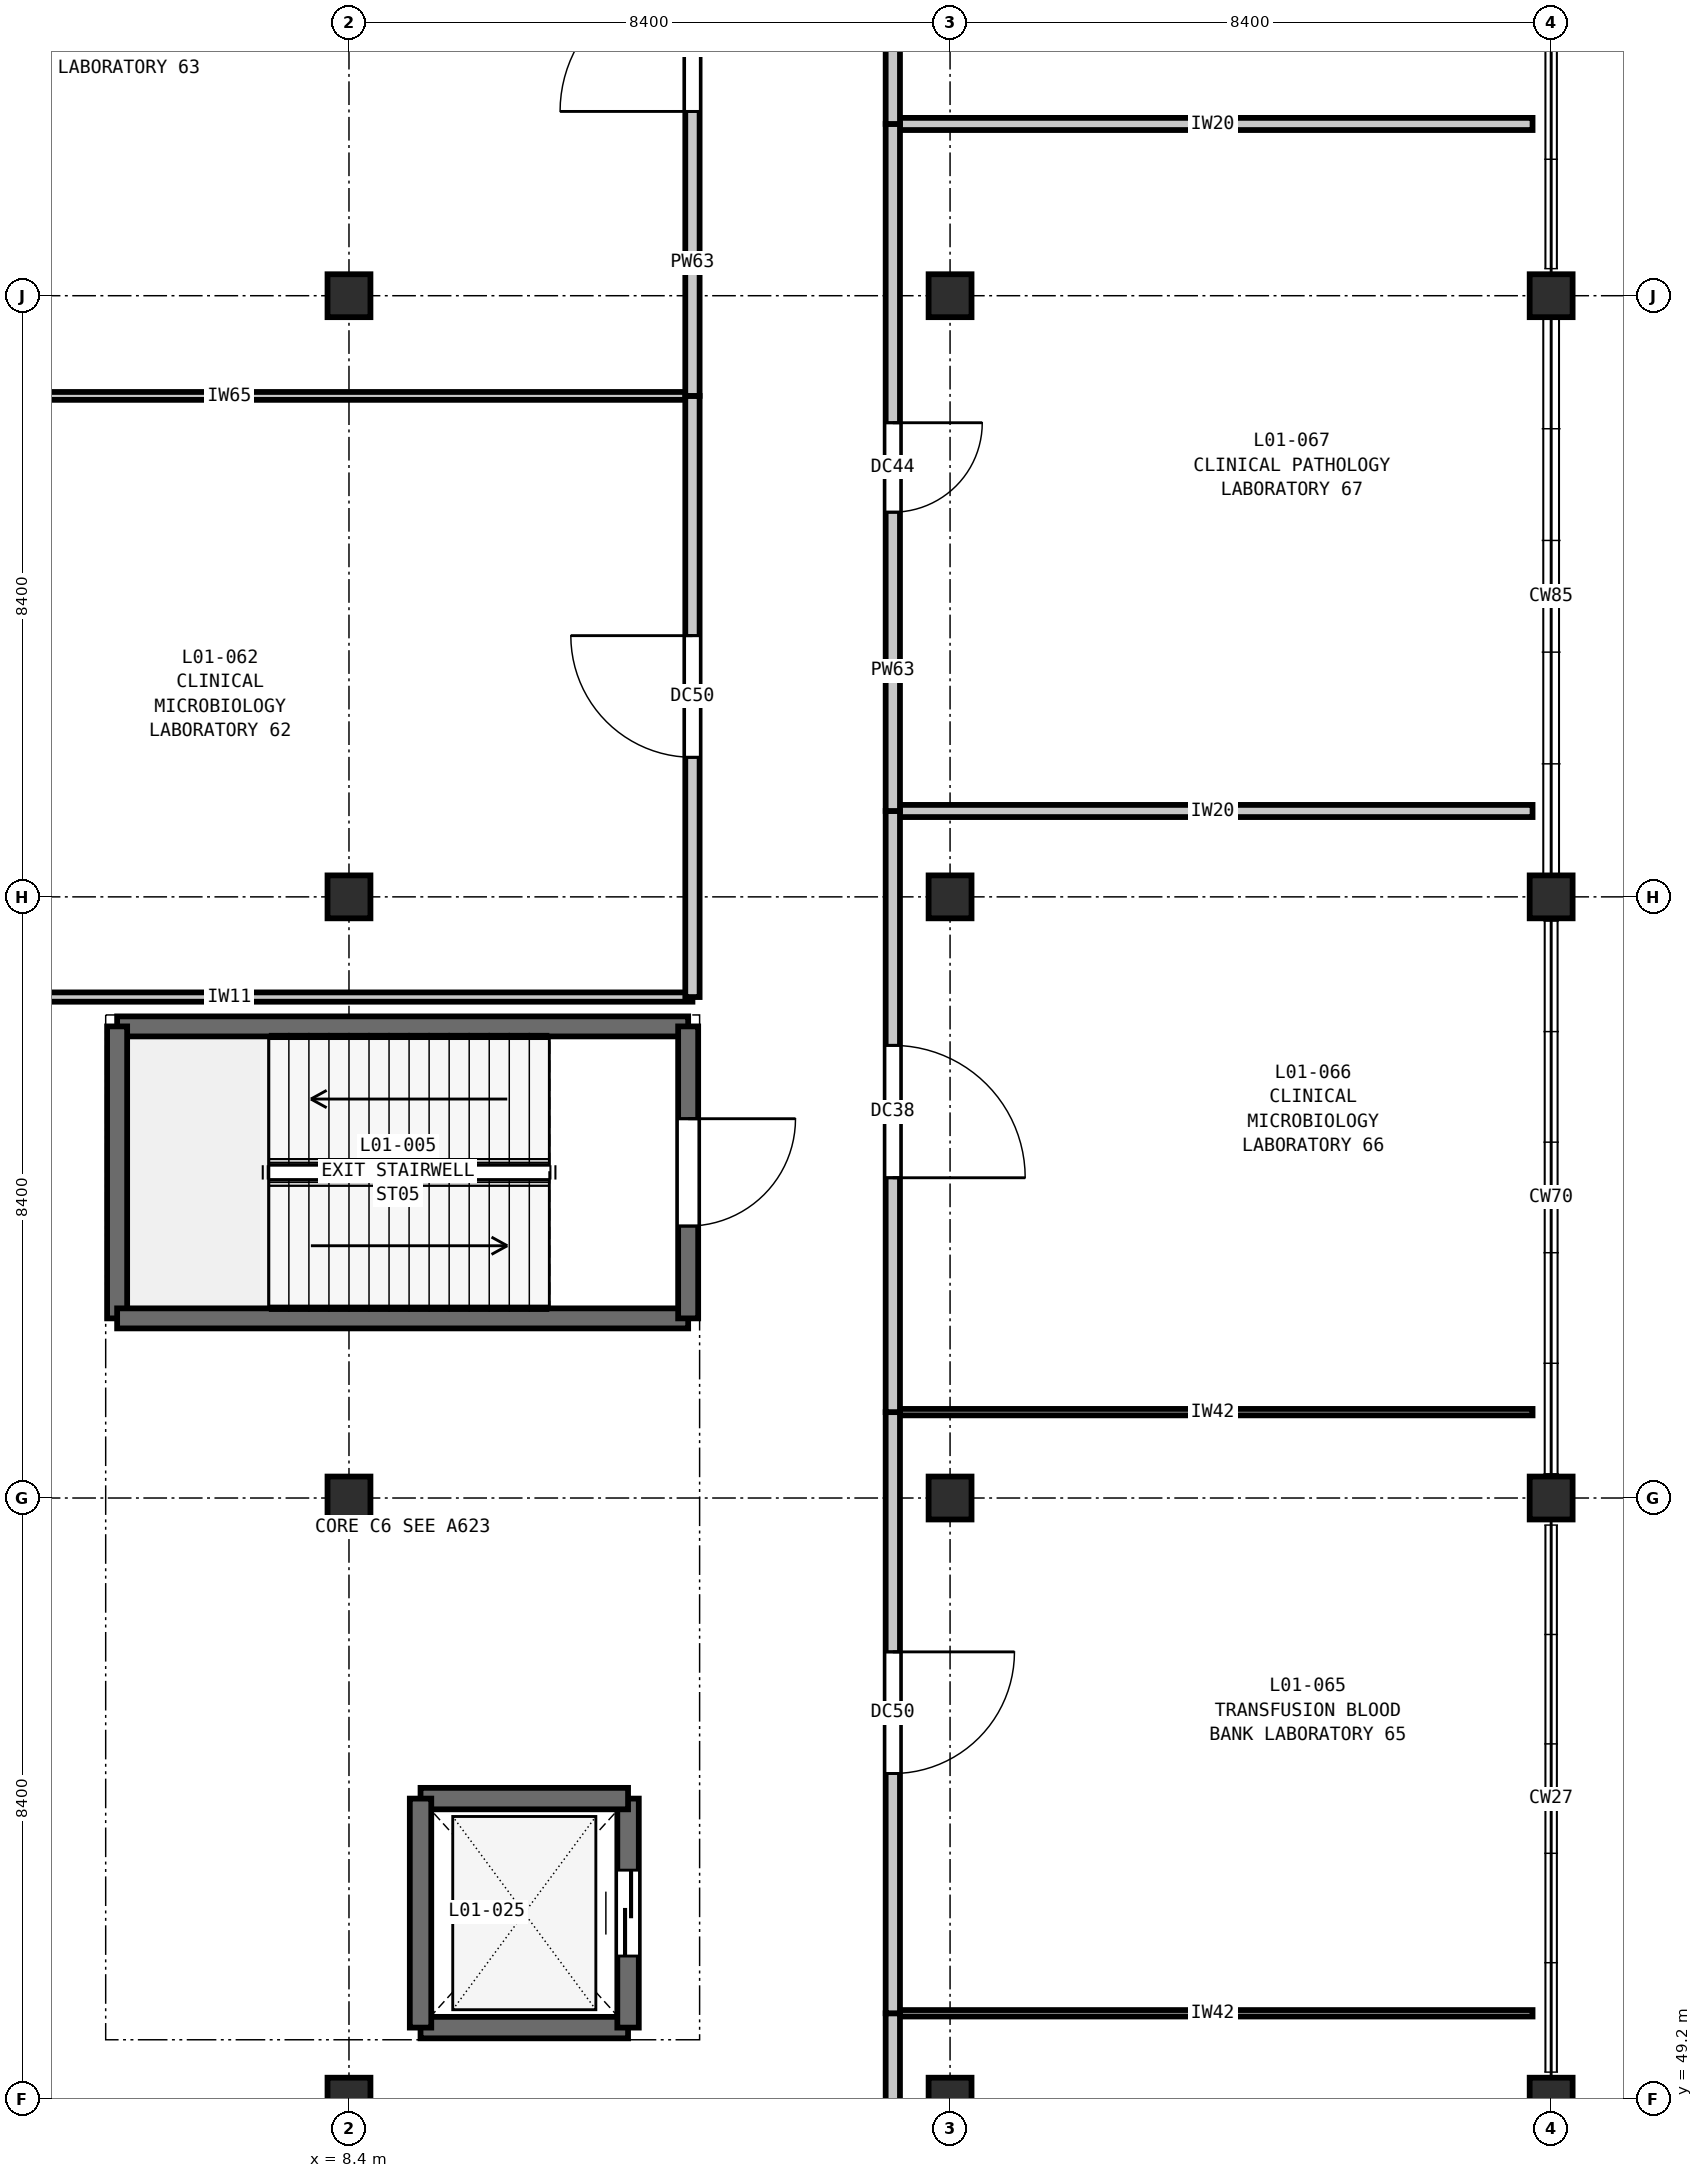
"""IFC4 building model, lengths in metres.
Left out: names, types, materials, properties, quantities, classifications, styles, units other than length and angle.
Written with IfcOpenShell. Run it as: python <this file> out.ifc"""

import sys

from ifc_helpers import new_model, si_unit, direction, frame, frame_2d, origin, origin_2d, place, context, subcontext, project, spatial, rectangle, extrude, element, fill, save


model = new_model("IFC4")
c1 = context("Model", 3, precision=1e-05, world=origin(), true_north=direction((0.0, 1.0)))
c2 = subcontext(c1, "Body", "Model", "MODEL_VIEW")
j1 = project(units=[si_unit("LENGTHUNIT", "METRE"), si_unit("PLANEANGLEUNIT", "RADIAN")], contexts=[c1])
p1 = place(None, origin())
s1 = spatial("IfcSite", under=j1, at=p1, CompositionType="ELEMENT")
p2 = place(p1, origin())
s2 = spatial("IfcBuilding", under=s1, at=p2, CompositionType="ELEMENT")
p3 = place(p2, frame((0.0, 0.0, 5.4)))
s3 = spatial("IfcBuildingStorey", under=s2, at=p3, CompositionType="ELEMENT", Elevation=5.4)
for number, where, z_axis, x_axis in (
    (1, (8.4, 49.2, 0.0), (0.0, 0.0, 1.0), (1.0, 0.0, 0.0)),
    (2, (8.4, 57.6, 0.0), (0.0, 0.0, 1.0), (1.0, 0.0, 0.0)),
    (3, (8.4, 66.0, 0.0), (0.0, 0.0, 1.0), (1.0, 0.0, 0.0)),
    (4, (8.4, 74.4, 0.0), (0.0, 0.0, 1.0), (1.0, 0.0, 0.0)),
    (5, (16.8, 49.2, 0.0), (0.0, 0.0, 1.0), (1.0, 0.0, 0.0)),
    (6, (16.8, 57.6, 0.0), (0.0, 0.0, 1.0), (1.0, 0.0, 0.0)),
    (7, (16.8, 66.0, 0.0), (0.0, 0.0, 1.0), (1.0, 0.0, 0.0)),
    (8, (16.8, 74.4, 0.0), (0.0, 0.0, 1.0), (1.0, 0.0, 0.0)),
    (9, (25.2, 49.2, 0.0), (0.0, 0.0, 1.0), (1.0, 0.0, 0.0)),
    (10, (25.2, 57.6, 0.0), (0.0, 0.0, 1.0), (1.0, 0.0, 0.0)),
    (11, (25.2, 66.0, 0.0), (0.0, 0.0, 1.0), (1.0, 0.0, 0.0)),
    (12, (25.2, 74.4, 0.0), (0.0, 0.0, 1.0), (1.0, 0.0, 0.0)),
):
    element("IfcColumn", number, at=place(p3, frame(where, z_axis=z_axis, x_axis=x_axis)), inside=s3, PredefinedType="COLUMN", context=c2, shape_type="SweptSolid", body=[
        extrude(rectangle(XDim=0.6, YDim=0.6, at=origin_2d()), origin(), (0.0, 0.0, 1.0), 5.4),
    ])
p4 = place(p3, frame((13.14, 64.19, 0.0), z_axis=(0.0, 0.0, 1.0), x_axis=(-1.0, 0.0, 0.0)))
e13 = element("IfcWall", 13, at=p4, inside=s3, PredefinedType="SHEAR", context=c2, shape_type="SweptSolid", body=[
    extrude(rectangle(XDim=7.98, YDim=0.28, at=frame_2d((3.99, 0.0))), origin(), (0.0, 0.0, 1.0), 5.4),
])
p5 = place(p3, frame((5.16, 64.19, 0.0), z_axis=(0.0, 0.0, 1.0), x_axis=(0.0, -1.0, 0.0)))
e14 = element("IfcWall", 14, at=p5, inside=s3, PredefinedType="SHEAR", context=c2, shape_type="SweptSolid", body=[
    extrude(rectangle(XDim=4.08, YDim=0.28, at=frame_2d((2.04, 0.0))), origin(), (0.0, 0.0, 1.0), 5.4),
])
p6 = place(p3, frame((5.16, 60.11, 0.0), z_axis=(0.0, 0.0, 1.0), x_axis=(1.0, 0.0, 0.0)))
e15 = element("IfcWall", 15, at=p6, inside=s3, PredefinedType="SHEAR", context=c2, shape_type="SweptSolid", body=[
    extrude(rectangle(XDim=7.98, YDim=0.28, at=frame_2d((3.99, 0.0))), origin(), (0.0, 0.0, 1.0), 5.4),
])
p7 = place(p3, frame((13.14, 60.11, 0.0), z_axis=(0.0, 0.0, 1.0), x_axis=(0.0, 1.0, 0.0)))
e16 = element("IfcWall", 16, at=p7, inside=s3, PredefinedType="SHEAR", context=c2, shape_type="SweptSolid", body=[
    extrude(rectangle(XDim=4.08, YDim=0.28, at=frame_2d((2.04, 0.0))), origin(), (0.0, 0.0, 1.0), 5.4),
])
p8 = place(p7, frame((1.29, 0.0, 0.0)))
e17 = element("IfcOpeningElement", 17, at=p8, cuts=e16, PredefinedType="OPENING", context=c2, shape_type="SweptSolid", body=[
    extrude(rectangle(XDim=1.5, YDim=2.2, at=frame_2d((0.75, 1.1))), frame((0.0, 0.15, 0.0), z_axis=(0.0, -1.0, 0.0), x_axis=(1.0, 0.0, 0.0)), (0.0, 0.0, 1.0), 0.3),
])
p9 = place(p3, frame((9.4, 50.2, 0.0), z_axis=(0.0, 0.0, 1.0), x_axis=(1.0, 0.0, 0.0)))
e18 = element("IfcWall", 18, at=p9, inside=s3, PredefinedType="SHEAR", context=c2, shape_type="SweptSolid", body=[
    extrude(rectangle(XDim=2.9, YDim=0.3, at=frame_2d((1.45, 0.0))), origin(), (0.0, 0.0, 1.0), 5.4),
])
p10 = place(p3, frame((12.3, 50.2, 0.0), z_axis=(0.0, 0.0, 1.0), x_axis=(0.0, 1.0, 0.0)))
e19 = element("IfcWall", 19, at=p10, inside=s3, PredefinedType="SHEAR", context=c2, shape_type="SweptSolid", body=[
    extrude(rectangle(XDim=3.2, YDim=0.3, at=frame_2d((1.6, 0.0))), origin(), (0.0, 0.0, 1.0), 5.4),
])
p11 = place(p10, frame((1.0, 0.0, 0.0)))
e20 = element("IfcOpeningElement", 20, at=p11, cuts=e19, PredefinedType="OPENING", context=c2, shape_type="SweptSolid", body=[
    extrude(rectangle(XDim=1.2, YDim=2.2, at=frame_2d((0.6, 1.1))), frame((0.0, 0.16, 0.0), z_axis=(0.0, -1.0, 0.0), x_axis=(1.0, 0.0, 0.0)), (0.0, 0.0, 1.0), 0.32),
])
p12 = place(p3, frame((12.3, 53.4, 0.0), z_axis=(0.0, 0.0, 1.0), x_axis=(-1.0, 0.0, 0.0)))
e21 = element("IfcWall", 21, at=p12, inside=s3, PredefinedType="SHEAR", context=c2, shape_type="SweptSolid", body=[
    extrude(rectangle(XDim=2.9, YDim=0.3, at=frame_2d((1.45, 0.0))), origin(), (0.0, 0.0, 1.0), 5.4),
])
p13 = place(p3, frame((9.4, 53.4, 0.0), z_axis=(0.0, 0.0, 1.0), x_axis=(0.0, -1.0, 0.0)))
e22 = element("IfcWall", 22, at=p13, inside=s3, PredefinedType="SHEAR", context=c2, shape_type="SweptSolid", body=[
    extrude(rectangle(XDim=3.2, YDim=0.3, at=frame_2d((1.6, 0.0))), origin(), (0.0, 0.0, 1.0), 5.4),
])
for number, where, z_axis, x_axis in (
    (23, (16.0, 50.4, 0.0), (0.0, 0.0, 1.0), (1.0, 0.0, 0.0)),
    (24, (16.0, 58.8, 0.0), (0.0, 0.0, 1.0), (1.0, 0.0, 0.0)),
):
    element("IfcWall", number, at=place(p3, frame(where, z_axis=z_axis, x_axis=x_axis)), inside=s3, PredefinedType="PARTITIONING", context=c2, shape_type="SweptSolid", body=[
        extrude(rectangle(XDim=8.94, YDim=0.09, at=frame_2d((4.47, 0.0))), origin(), (0.0, 0.0, 1.0), 5.05),
    ])
p14 = place(p3, frame((0.26, 64.6, 0.0), z_axis=(0.0, 0.0, 1.0), x_axis=(1.0, 0.0, 0.0)))
e25 = element("IfcWall", 25, at=p14, inside=s3, PredefinedType="PARTITIONING", context=c2, shape_type="SweptSolid", body=[
    extrude(rectangle(XDim=12.94, YDim=0.13, at=frame_2d((6.47, 0.0))), origin(), (0.0, 0.0, 1.0), 5.05),
])
p15 = place(p3, frame((16.0, 67.2, 0.0), z_axis=(0.0, 0.0, 1.0), x_axis=(1.0, 0.0, 0.0)))
e26 = element("IfcWall", 26, at=p15, inside=s3, PredefinedType="PARTITIONING", context=c2, shape_type="SweptSolid", body=[
    extrude(rectangle(XDim=8.94, YDim=0.17, at=frame_2d((4.47, 0.0))), origin(), (0.0, 0.0, 1.0), 5.05),
])
p16 = place(p3, frame((0.26, 73.0, 0.0), z_axis=(0.0, 0.0, 1.0), x_axis=(1.0, 0.0, 0.0)))
e27 = element("IfcWall", 27, at=p16, inside=s3, PredefinedType="PARTITIONING", context=c2, shape_type="SweptSolid", body=[
    extrude(rectangle(XDim=12.94, YDim=0.11, at=frame_2d((6.47, 0.0))), origin(), (0.0, 0.0, 1.0), 5.05),
])
p17 = place(p3, frame((16.0, 76.8, 0.0), z_axis=(0.0, 0.0, 1.0), x_axis=(1.0, 0.0, 0.0)))
e28 = element("IfcWall", 28, at=p17, inside=s3, PredefinedType="PARTITIONING", context=c2, shape_type="SweptSolid", body=[
    extrude(rectangle(XDim=8.94, YDim=0.17, at=frame_2d((4.47, 0.0))), origin(), (0.0, 0.0, 1.0), 5.05),
])
p18 = place(p3, frame((13.2, 64.6, 0.0), z_axis=(0.0, 0.0, 1.0), x_axis=(0.0, 1.0, 0.0)))
e29 = element("IfcWall", 29, at=p18, inside=s3, PredefinedType="PARTITIONING", context=c2, shape_type="SweptSolid", body=[
    extrude(rectangle(XDim=8.4, YDim=0.2, at=frame_2d((4.2, 0.0))), origin(), (0.0, 0.0, 1.0), 5.05),
])
p19 = place(p18, frame((3.35, 0.0, 0.0)))
e30 = element("IfcOpeningElement", 30, at=p19, cuts=e29, PredefinedType="OPENING", context=c2, shape_type="SweptSolid", body=[
    extrude(rectangle(XDim=1.7, YDim=2.3, at=frame_2d((0.85, 1.15))), frame((0.0, 0.11, 0.0), z_axis=(0.0, -1.0, 0.0), x_axis=(1.0, 0.0, 0.0)), (0.0, 0.0, 1.0), 0.22),
])
p20 = place(p3, frame((13.2, 73.0, 0.0), z_axis=(0.0, 0.0, 1.0), x_axis=(0.0, 1.0, 0.0)))
e31 = element("IfcWall", 31, at=p20, inside=s3, PredefinedType="PARTITIONING", context=c2, shape_type="SweptSolid", body=[
    extrude(rectangle(XDim=9.8, YDim=0.2, at=frame_2d((4.9, 0.0))), origin(), (0.0, 0.0, 1.0), 5.05),
])
p21 = place(p20, frame((3.975, 0.0, 0.0)))
e32 = element("IfcOpeningElement", 32, at=p21, cuts=e31, PredefinedType="OPENING", context=c2, shape_type="SweptSolid", body=[
    extrude(rectangle(XDim=1.85, YDim=2.3, at=frame_2d((0.925, 1.15))), frame((0.0, 0.11, 0.0), z_axis=(0.0, -1.0, 0.0), x_axis=(1.0, 0.0, 0.0)), (0.0, 0.0, 1.0), 0.22),
])
p22 = place(p3, frame((16.0, 40.8, 0.0), z_axis=(0.0, 0.0, 1.0), x_axis=(0.0, 1.0, 0.0)))
e33 = element("IfcWall", 33, at=p22, inside=s3, PredefinedType="PARTITIONING", context=c2, shape_type="SweptSolid", body=[
    extrude(rectangle(XDim=9.6, YDim=0.2, at=frame_2d((4.8, 0.0))), origin(), (0.0, 0.0, 1.0), 5.05),
])
p23 = place(p22, frame((4.025, 0.0, 0.0)))
e34 = element("IfcOpeningElement", 34, at=p23, cuts=e33, PredefinedType="OPENING", context=c2, shape_type="SweptSolid", body=[
    extrude(rectangle(XDim=1.55, YDim=2.25, at=frame_2d((0.775, 1.125))), frame((0.0, 0.11, 0.0), z_axis=(0.0, -1.0, 0.0), x_axis=(1.0, 0.0, 0.0)), (0.0, 0.0, 1.0), 0.22),
])
p24 = place(p3, frame((16.0, 50.4, 0.0), z_axis=(0.0, 0.0, 1.0), x_axis=(0.0, 1.0, 0.0)))
e35 = element("IfcWall", 35, at=p24, inside=s3, PredefinedType="PARTITIONING", context=c2, shape_type="SweptSolid", body=[
    extrude(rectangle(XDim=8.4, YDim=0.2, at=frame_2d((4.2, 0.0))), origin(), (0.0, 0.0, 1.0), 5.05),
])
p25 = place(p24, frame((3.35, 0.0, 0.0)))
e36 = element("IfcOpeningElement", 36, at=p25, cuts=e35, PredefinedType="OPENING", context=c2, shape_type="SweptSolid", body=[
    extrude(rectangle(XDim=1.7, YDim=2.3, at=frame_2d((0.85, 1.15))), frame((0.0, 0.11, 0.0), z_axis=(0.0, -1.0, 0.0), x_axis=(1.0, 0.0, 0.0)), (0.0, 0.0, 1.0), 0.22),
])
p26 = place(p3, frame((16.0, 58.8, 0.0), z_axis=(0.0, 0.0, 1.0), x_axis=(0.0, 1.0, 0.0)))
e37 = element("IfcWall", 37, at=p26, inside=s3, PredefinedType="PARTITIONING", context=c2, shape_type="SweptSolid", body=[
    extrude(rectangle(XDim=8.4, YDim=0.2, at=frame_2d((4.2, 0.0))), origin(), (0.0, 0.0, 1.0), 5.05),
])
p27 = place(p26, frame((3.275, 0.0, 0.0)))
e38 = element("IfcOpeningElement", 38, at=p27, cuts=e37, PredefinedType="OPENING", context=c2, shape_type="SweptSolid", body=[
    extrude(rectangle(XDim=1.85, YDim=2.3, at=frame_2d((0.925, 1.15))), frame((0.0, 0.11, 0.0), z_axis=(0.0, -1.0, 0.0), x_axis=(1.0, 0.0, 0.0)), (0.0, 0.0, 1.0), 0.22),
])
p28 = place(p3, frame((16.0, 67.2, 0.0), z_axis=(0.0, 0.0, 1.0), x_axis=(0.0, 1.0, 0.0)))
e39 = element("IfcWall", 39, at=p28, inside=s3, PredefinedType="PARTITIONING", context=c2, shape_type="SweptSolid", body=[
    extrude(rectangle(XDim=9.6, YDim=0.2, at=frame_2d((4.8, 0.0))), origin(), (0.0, 0.0, 1.0), 5.05),
])
p29 = place(p28, frame((4.175, 0.0, 0.0)))
e40 = element("IfcOpeningElement", 40, at=p29, cuts=e39, PredefinedType="OPENING", context=c2, shape_type="SweptSolid", body=[
    extrude(rectangle(XDim=1.25, YDim=2.15, at=frame_2d((0.625, 1.075))), frame((0.0, 0.11, 0.0), z_axis=(0.0, -1.0, 0.0), x_axis=(1.0, 0.0, 0.0)), (0.0, 0.0, 1.0), 0.22),
])
p30 = place(p3, frame((16.0, 76.8, 0.0), z_axis=(0.0, 0.0, 1.0), x_axis=(0.0, 1.0, 0.0)))
e41 = element("IfcWall", 41, at=p30, inside=s3, PredefinedType="PARTITIONING", context=c2, shape_type="SweptSolid", body=[
    extrude(rectangle(XDim=6.0, YDim=0.2, at=frame_2d((3.0, 0.0))), origin(), (0.0, 0.0, 1.0), 5.05),
])
p31 = place(p30, frame((2.35, 0.0, 0.0)))
e42 = element("IfcOpeningElement", 42, at=p31, cuts=e41, PredefinedType="OPENING", context=c2, shape_type="SweptSolid", body=[
    extrude(rectangle(XDim=1.3, YDim=2.2, at=frame_2d((0.65, 1.1))), frame((0.0, 0.11, 0.0), z_axis=(0.0, -1.0, 0.0), x_axis=(1.0, 0.0, 0.0)), (0.0, 0.0, 1.0), 0.22),
])
p32 = place(p8, frame((1.5, 0.0, 0.0), z_axis=(0.0, 0.0, 1.0), x_axis=(-1.0, 0.0, 0.0)))
e43 = element("IfcDoor", 43, at=p32, inside=s3, OperationType="SINGLE_SWING_LEFT", PredefinedType="DOOR", context=c2, shape_type="SweptSolid", body=[
    extrude(rectangle(XDim=1.5, YDim=2.2, at=frame_2d((0.75, 1.1))), frame((0.0, 0.025, 0.0), z_axis=(0.0, -1.0, 0.0), x_axis=(1.0, 0.0, 0.0)), (0.0, 0.0, 1.0), 0.05),
])
fill(e17, e43)
p33 = place(p11, origin())
e44 = element("IfcDoor", 44, at=p33, inside=s3, OperationType="DOUBLE_DOOR_SLIDING", PredefinedType="DOOR", context=c2, shape_type="SweptSolid", body=[
    extrude(rectangle(XDim=1.2, YDim=2.2, at=frame_2d((0.6, 1.1))), frame((0.0, 0.025, 0.0), z_axis=(0.0, -1.0, 0.0), x_axis=(1.0, 0.0, 0.0)), (0.0, 0.0, 1.0), 0.05),
])
fill(e20, e44)
p34 = place(p19, origin())
e45 = element("IfcDoor", 45, at=p34, inside=s3, OperationType="SINGLE_SWING_RIGHT", PredefinedType="DOOR", context=c2, shape_type="SweptSolid", body=[
    extrude(rectangle(XDim=1.7, YDim=2.3, at=frame_2d((0.85, 1.15))), frame((0.0, 0.025, 0.0), z_axis=(0.0, -1.0, 0.0), x_axis=(1.0, 0.0, 0.0)), (0.0, 0.0, 1.0), 0.05),
])
fill(e30, e45)
p35 = place(p21, origin())
e46 = element("IfcDoor", 46, at=p35, inside=s3, OperationType="SINGLE_SWING_LEFT", PredefinedType="DOOR", context=c2, shape_type="SweptSolid", body=[
    extrude(rectangle(XDim=1.85, YDim=2.3, at=frame_2d((0.925, 1.15))), frame((0.0, 0.025, 0.0), z_axis=(0.0, -1.0, 0.0), x_axis=(1.0, 0.0, 0.0)), (0.0, 0.0, 1.0), 0.05),
])
fill(e32, e46)
p36 = place(p25, frame((1.7, 0.0, 0.0), z_axis=(0.0, 0.0, 1.0), x_axis=(-1.0, 0.0, 0.0)))
e47 = element("IfcDoor", 47, at=p36, inside=s3, OperationType="SINGLE_SWING_LEFT", PredefinedType="DOOR", context=c2, shape_type="SweptSolid", body=[
    extrude(rectangle(XDim=1.7, YDim=2.3, at=frame_2d((0.85, 1.15))), frame((0.0, 0.025, 0.0), z_axis=(0.0, -1.0, 0.0), x_axis=(1.0, 0.0, 0.0)), (0.0, 0.0, 1.0), 0.05),
])
fill(e36, e47)
p37 = place(p27, frame((1.85, 0.0, 0.0), z_axis=(0.0, 0.0, 1.0), x_axis=(-1.0, 0.0, 0.0)))
e48 = element("IfcDoor", 48, at=p37, inside=s3, OperationType="SINGLE_SWING_RIGHT", PredefinedType="DOOR", context=c2, shape_type="SweptSolid", body=[
    extrude(rectangle(XDim=1.85, YDim=2.3, at=frame_2d((0.925, 1.15))), frame((0.0, 0.025, 0.0), z_axis=(0.0, -1.0, 0.0), x_axis=(1.0, 0.0, 0.0)), (0.0, 0.0, 1.0), 0.05),
])
fill(e38, e48)
p38 = place(p29, frame((1.25, 0.0, 0.0), z_axis=(0.0, 0.0, 1.0), x_axis=(-1.0, 0.0, 0.0)))
e49 = element("IfcDoor", 49, at=p38, inside=s3, OperationType="SINGLE_SWING_LEFT", PredefinedType="DOOR", context=c2, shape_type="SweptSolid", body=[
    extrude(rectangle(XDim=1.25, YDim=2.15, at=frame_2d((0.625, 1.075))), frame((0.0, 0.025, 0.0), z_axis=(0.0, -1.0, 0.0), x_axis=(1.0, 0.0, 0.0)), (0.0, 0.0, 1.0), 0.05),
])
fill(e40, e49)
save(model, sys.argv[1])
